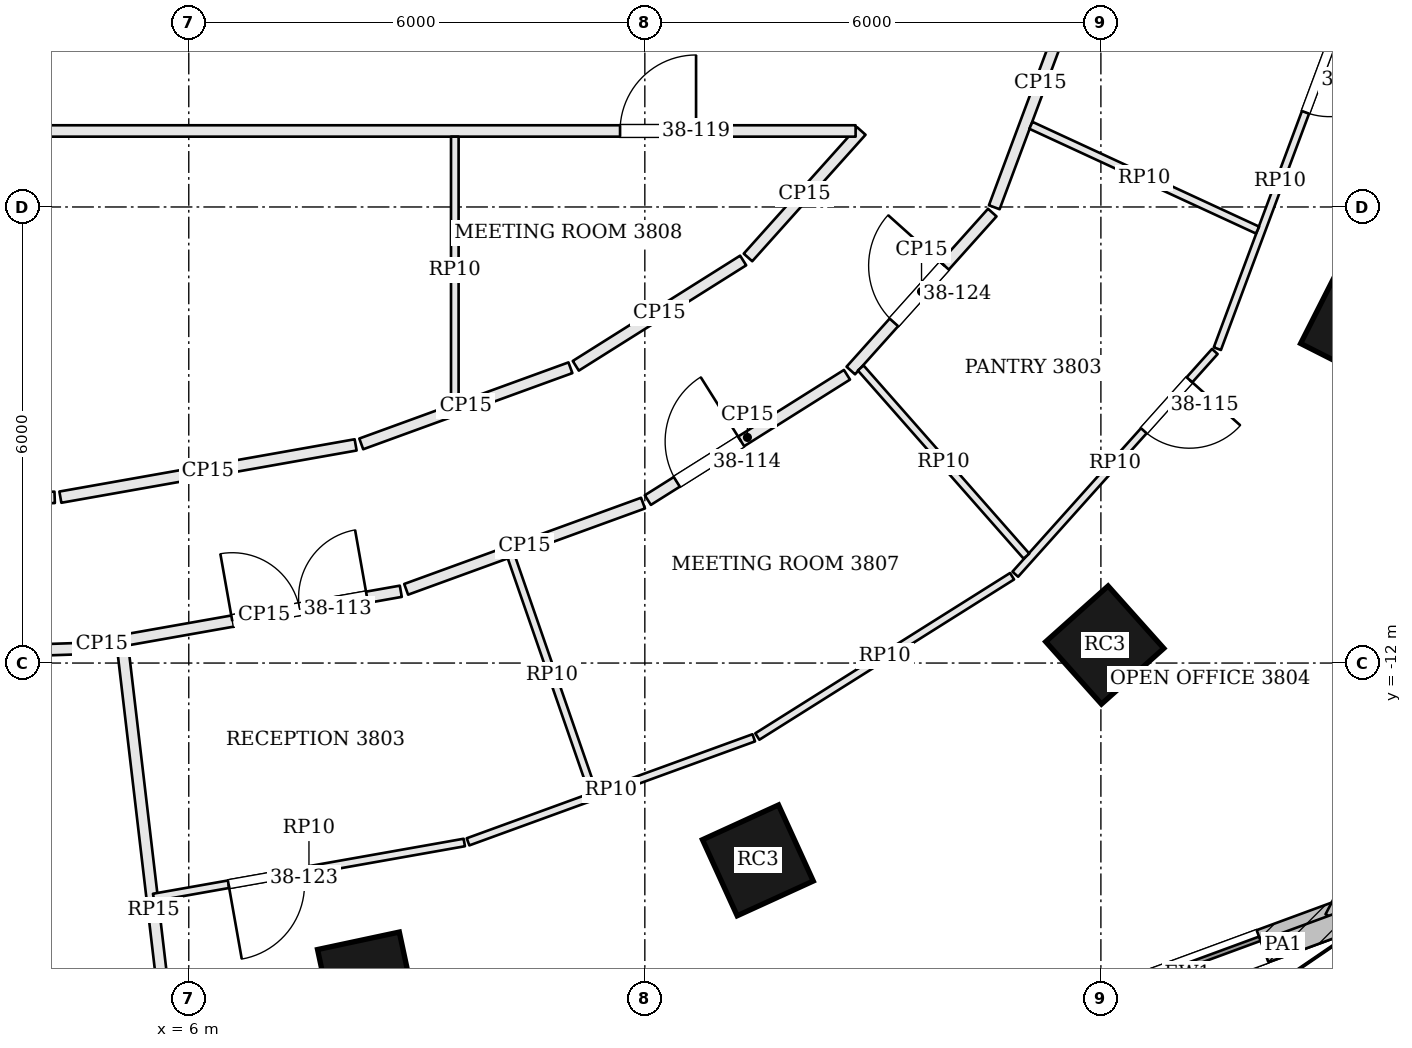
"""IFC4 building model, lengths in metres.
Left out: names, types, materials, properties, quantities, classifications, styles, units other than length and angle.
Written with IfcOpenShell. Run it as: python <this file> out.ifc"""

import sys

from ifc_helpers import new_model, si_unit, direction, frame, frame_2d, origin, origin_2d, place, context, subcontext, project, spatial, rectangle, extrude, element, fill, save


model = new_model("IFC4")
c1 = context("Model", 3, precision=1e-05, world=origin(), true_north=direction((0.0, 1.0)))
c2 = subcontext(c1, "Body", "Model", "MODEL_VIEW")
j1 = project(units=[si_unit("LENGTHUNIT", "METRE"), si_unit("PLANEANGLEUNIT", "RADIAN")], contexts=[c1])
p1 = place(None, origin())
s1 = spatial("IfcSite", under=j1, at=p1, CompositionType="ELEMENT")
p2 = place(p1, origin())
s2 = spatial("IfcBuilding", under=s1, at=p2, CompositionType="ELEMENT")
p3 = place(p2, frame((0.0, 0.0, 157.8)))
s3 = spatial("IfcBuildingStorey", under=s2, at=p3, CompositionType="ELEMENT", Elevation=157.8)
for number, where, z_axis, x_axis in (
    (1, (8.347, -16.192, 0.0), (0.0, 0.0, 1.0), (0.978, 0.209, 0.0)),
    (2, (13.487, -14.596, 0.0), (0.0, 0.0, 1.0), (0.91, 0.415, 0.0)),
    (3, (18.051, -11.763, 0.0), (0.0, 0.0, 1.0), (0.746, 0.666, 0.0)),
    (4, (21.367, -7.554, 0.0), (0.0, 0.0, 1.0), (0.452, 0.892, 0.0)),
):
    element("IfcColumn", number, at=place(p3, frame(where, z_axis=z_axis, x_axis=x_axis)), inside=s3, PredefinedType="COLUMN", context=c2, shape_type="SweptSolid", body=[
        extrude(rectangle(XDim=1.1, YDim=1.1, at=origin_2d()), origin(), (0.0, 0.0, 1.0), 3.9),
    ])
p4 = place(p3, frame((17.006, -16.873, 0.0), z_axis=(0.0, 0.0, 1.0), x_axis=(0.938563728531, 0.345105965591, 0.0)))
e5 = element("IfcWall", 5, at=p4, inside=s3, PredefinedType="SOLIDWALL", context=c2, shape_type="SweptSolid", body=[
    extrude(rectangle(XDim=4.55, YDim=0.45, at=frame_2d((2.275, 0.0))), origin(), (0.0, 0.0, 1.0), 3.7),
])
p5 = place(p4, frame((1.225, 0.0, 0.9)))
e6 = element("IfcOpeningElement", 6, at=p5, cuts=e5, PredefinedType="OPENING", context=c2, shape_type="SweptSolid", body=[
    extrude(rectangle(XDim=2.1, YDim=2.3, at=frame_2d((1.05, 1.15))), frame((0.0, 0.235, 0.0), z_axis=(0.0, -1.0, 0.0), x_axis=(1.0, 0.0, 0.0)), (0.0, 0.0, 1.0), 0.47),
])
p6 = place(p3, frame((21.155, -15.41, 0.0), z_axis=(0.0, 0.0, 1.0), x_axis=(0.46287314096, 0.886424534508, 0.0)))
e7 = element("IfcWall", 7, at=p6, inside=s3, PredefinedType="SOLIDWALL", context=c2, shape_type="SweptSolid", body=[
    extrude(rectangle(XDim=4.129, YDim=0.45, at=frame_2d((2.064, 0.0))), origin(), (0.0, 0.0, 1.0), 3.7),
])
p7 = place(p6, frame((1.014, 0.0, 0.9)))
e8 = element("IfcOpeningElement", 8, at=p7, cuts=e7, PredefinedType="OPENING", context=c2, shape_type="SweptSolid", body=[
    extrude(rectangle(XDim=2.1, YDim=2.3, at=frame_2d((1.05, 1.15))), frame((0.0, 0.235, 0.0), z_axis=(0.0, -1.0, 0.0), x_axis=(1.0, 0.0, 0.0)), (0.0, 0.0, 1.0), 0.47),
])
p8 = place(p3, frame((19.63, -15.988, 3.9), z_axis=(0.0, 0.0, 1.0), x_axis=(0.938567178283, 0.345096583364, 0.0)))
e9 = element("IfcWall", 9, at=p8, inside=s3, PredefinedType="PARAPET", context=c2, shape_type="SweptSolid", body=[
    extrude(rectangle(XDim=1.636, YDim=0.3, at=frame_2d((0.818, 0.0))), origin(), (0.0, 0.0, 1.0), 1.1),
])
p9 = place(p3, frame((-0.875, -11.993, 0.0), z_axis=(0.0, 0.0, 1.0), x_axis=(0.999436745295, 0.033558786542, 0.0)))
e10 = element("IfcWall", 10, at=p9, inside=s3, PredefinedType="PARTITIONING", context=c2, shape_type="SweptSolid", body=[
    extrude(rectangle(XDim=5.398, YDim=0.15, at=frame_2d((2.699, 0.0))), origin(), (0.0, 0.0, 1.0), 3.198),
])
p10 = place(p3, frame((4.594, -11.799, 0.0), z_axis=(0.0, 0.0, 1.0), x_axis=(0.984663784655, 0.174462692828, 0.0)))
e11 = element("IfcWall", 11, at=p10, inside=s3, PredefinedType="PARTITIONING", context=c2, shape_type="SweptSolid", body=[
    extrude(rectangle(XDim=0.535, YDim=0.15, at=frame_2d((0.267, 0.0))), origin(), (0.0, 0.0, 1.0), 3.198),
])
p11 = place(p3, frame((5.945, -18.719, 0.0), z_axis=(0.0, 0.0, 1.0), x_axis=(-0.116887879272, 0.99314511713, 0.0)))
e12 = element("IfcWall", 12, at=p11, inside=s3, PredefinedType="PARTITIONING", context=c2, shape_type="SweptSolid", body=[
    extrude(rectangle(XDim=6.987, YDim=0.15, at=frame_2d((3.493, 0.0))), origin(), (0.0, 0.0, 1.0), 3.234),
])
p12 = place(p3, frame((5.194, -11.692, 0.0), z_axis=(0.0, 0.0, 1.0), x_axis=(0.984692559416, 0.174300210646, 0.0)))
e13 = element("IfcWall", 13, at=p12, inside=s3, PredefinedType="PARTITIONING", context=c2, shape_type="SweptSolid", body=[
    extrude(rectangle(XDim=3.652, YDim=0.15, at=frame_2d((1.826, 0.0))), origin(), (0.0, 0.0, 1.0), 3.198),
])
p13 = place(p12, frame((1.4, 0.0, 0.0)))
e14 = element("IfcOpeningElement", 14, at=p13, cuts=e13, PredefinedType="OPENING", context=c2, shape_type="SweptSolid", body=[
    extrude(rectangle(XDim=1.8, YDim=2.1, at=frame_2d((0.9, 1.05))), frame((0.0, 0.085, 0.0), z_axis=(0.0, -1.0, 0.0), x_axis=(1.0, 0.0, 0.0)), (0.0, 0.0, 1.0), 0.17),
])
p14 = place(p3, frame((8.86, -11.03, 0.0), z_axis=(0.0, 0.0, 1.0), x_axis=(0.939685902536, 0.342038601001, 0.0)))
e15 = element("IfcWall", 15, at=p14, inside=s3, PredefinedType="PARTITIONING", context=c2, shape_type="SweptSolid", body=[
    extrude(rectangle(XDim=3.316, YDim=0.15, at=frame_2d((1.658, 0.0))), origin(), (0.0, 0.0, 1.0), 3.198),
])
p15 = place(p3, frame((12.04, -9.856, 0.0), z_axis=(0.0, 0.0, 1.0), x_axis=(0.846394809937, 0.532555936697, 0.0)))
e16 = element("IfcWall", 16, at=p15, inside=s3, PredefinedType="PARTITIONING", context=c2, shape_type="SweptSolid", body=[
    extrude(rectangle(XDim=3.095, YDim=0.15, at=frame_2d((1.548, 0.0))), origin(), (0.0, 0.0, 1.0), 3.198),
])
p16 = place(p15, frame((0.45, 0.0, 0.0)))
e17 = element("IfcOpeningElement", 17, at=p16, cuts=e16, PredefinedType="OPENING", context=c2, shape_type="SweptSolid", body=[
    extrude(rectangle(XDim=1.0, YDim=2.4, at=frame_2d((0.5, 1.2))), frame((0.0, 0.085, 0.0), z_axis=(0.0, -1.0, 0.0), x_axis=(1.0, 0.0, 0.0)), (0.0, 0.0, 1.0), 0.17),
])
p17 = place(p3, frame((14.709, -8.152, 0.0), z_axis=(0.0, 0.0, 1.0), x_axis=(0.667275630306, 0.744810870758, 0.0)))
e18 = element("IfcWall", 18, at=p17, inside=s3, PredefinedType="PARTITIONING", context=c2, shape_type="SweptSolid", body=[
    extrude(rectangle(XDim=2.79, YDim=0.15, at=frame_2d((1.395, 0.0))), origin(), (0.0, 0.0, 1.0), 3.198),
])
p18 = place(p17, frame((0.85, 0.0, 0.0)))
e19 = element("IfcOpeningElement", 19, at=p18, cuts=e18, PredefinedType="OPENING", context=c2, shape_type="SweptSolid", body=[
    extrude(rectangle(XDim=1.0, YDim=2.1, at=frame_2d((0.5, 1.05))), frame((0.0, 0.085, 0.0), z_axis=(0.0, -1.0, 0.0), x_axis=(1.0, 0.0, 0.0)), (0.0, 0.0, 1.0), 0.17),
])
p19 = place(p3, frame((16.597, -6.003, 0.0), z_axis=(0.0, 0.0, 1.0), x_axis=(0.349499455299, 0.936936567088, 0.0)))
e20 = element("IfcWall", 20, at=p19, inside=s3, PredefinedType="PARTITIONING", context=c2, shape_type="SweptSolid", body=[
    extrude(rectangle(XDim=3.477, YDim=0.15, at=frame_2d((1.739, 0.0))), origin(), (0.0, 0.0, 1.0), 3.198),
])
p20 = place(p3, frame((14.848, -5.0, 0.0), z_axis=(0.0, 0.0, 1.0), x_axis=(-0.667363249373, -0.744732363595, 0.0)))
e21 = element("IfcWall", 21, at=p20, inside=s3, PredefinedType="PARTITIONING", context=c2, shape_type="SweptSolid", body=[
    extrude(rectangle(XDim=2.234, YDim=0.15, at=frame_2d((1.117, 0.0))), origin(), (0.0, 0.0, 1.0), 3.198),
])
p21 = place(p3, frame((13.293, -6.704, 0.0), z_axis=(0.0, 0.0, 1.0), x_axis=(-0.84641299998, -0.532527026041, 0.0)))
e22 = element("IfcWall", 22, at=p21, inside=s3, PredefinedType="PARTITIONING", context=c2, shape_type="SweptSolid", body=[
    extrude(rectangle(XDim=2.602, YDim=0.15, at=frame_2d((1.301, 0.0))), origin(), (0.0, 0.0, 1.0), 3.198),
])
p22 = place(p3, frame((11.021, -8.115, 0.0), z_axis=(0.0, 0.0, 1.0), x_axis=(-0.939683845313, -0.342044252778, 0.0)))
e23 = element("IfcWall", 23, at=p22, inside=s3, PredefinedType="PARTITIONING", context=c2, shape_type="SweptSolid", body=[
    extrude(rectangle(XDim=2.929, YDim=0.15, at=frame_2d((1.464, 0.0))), origin(), (0.0, 0.0, 1.0), 3.198),
])
p23 = place(p3, frame((8.195, -9.13, 0.0), z_axis=(0.0, 0.0, 1.0), x_axis=(-0.9846880937, -0.174325437403, 0.0)))
e24 = element("IfcWall", 24, at=p23, inside=s3, PredefinedType="PARTITIONING", context=c2, shape_type="SweptSolid", body=[
    extrude(rectangle(XDim=3.945, YDim=0.15, at=frame_2d((1.973, 0.0))), origin(), (0.0, 0.0, 1.0), 3.198),
])
p24 = place(p3, frame((4.236, -9.82, 0.0), z_axis=(0.0, 0.0, 1.0), x_axis=(-0.999435760561, -0.033588100749, 0.0)))
e25 = element("IfcWall", 25, at=p24, inside=s3, PredefinedType="PARTITIONING", context=c2, shape_type="SweptSolid", body=[
    extrude(rectangle(XDim=5.146, YDim=0.15, at=frame_2d((2.573, 0.0))), origin(), (0.0, 0.0, 1.0), 3.198),
])
p25 = place(p3, frame((-14.789, -5.0, 0.0), z_axis=(0.0, 0.0, 1.0), x_axis=(1.0, 0.0, 0.0)))
e26 = element("IfcWall", 26, at=p25, inside=s3, PredefinedType="PARTITIONING", context=c2, shape_type="SweptSolid", body=[
    extrude(rectangle(XDim=29.562, YDim=0.15, at=frame_2d((14.781, 0.0))), origin(), (0.0, 0.0, 1.0), 3.198),
])
p26 = place(p25, frame((2.107, 0.0, 0.0)))
e27 = element("IfcOpeningElement", 27, at=p26, cuts=e26, PredefinedType="OPENING", context=c2, shape_type="SweptSolid", body=[
    extrude(rectangle(XDim=1.0, YDim=2.1, at=frame_2d((0.5, 1.05))), frame((0.0, 0.085, 0.0), z_axis=(0.0, -1.0, 0.0), x_axis=(1.0, 0.0, 0.0)), (0.0, 0.0, 1.0), 0.17),
])
p27 = place(p25, frame((13.889, 0.0, 0.0)))
e28 = element("IfcOpeningElement", 28, at=p27, cuts=e26, PredefinedType="OPENING", context=c2, shape_type="SweptSolid", body=[
    extrude(rectangle(XDim=1.8, YDim=2.1, at=frame_2d((0.9, 1.05))), frame((0.0, 0.085, 0.0), z_axis=(0.0, -1.0, 0.0), x_axis=(1.0, 0.0, 0.0)), (0.0, 0.0, 1.0), 0.17),
])
p28 = place(p25, frame((26.463, 0.0, 0.0)))
e29 = element("IfcOpeningElement", 29, at=p28, cuts=e26, PredefinedType="OPENING", context=c2, shape_type="SweptSolid", body=[
    extrude(rectangle(XDim=1.0, YDim=2.4, at=frame_2d((0.5, 1.2))), frame((0.0, 0.085, 0.0), z_axis=(0.0, -1.0, 0.0), x_axis=(1.0, 0.0, 0.0)), (0.0, 0.0, 1.0), 0.17),
])
p29 = place(p3, frame((21.181, -3.443, 0.0), z_axis=(0.0, 0.0, 1.0), x_axis=(-0.349438657616, -0.936959243811, 0.0)))
e30 = element("IfcWall", 30, at=p29, inside=s3, PredefinedType="PARTITIONING", context=c2, shape_type="SweptSolid", body=[
    extrude(rectangle(XDim=4.718, YDim=0.1, at=frame_2d((2.359, 0.0))), origin(), (0.0, 0.0, 1.0), 3.184),
])
p30 = place(p29, frame((0.5, 0.0, 0.0)))
e31 = element("IfcOpeningElement", 31, at=p30, cuts=e30, PredefinedType="OPENING", context=c2, shape_type="SweptSolid", body=[
    extrude(rectangle(XDim=0.9, YDim=2.1, at=frame_2d((0.45, 1.05))), frame((0.0, 0.06, 0.0), z_axis=(0.0, -1.0, 0.0), x_axis=(1.0, 0.0, 0.0)), (0.0, 0.0, 1.0), 0.12),
])
p31 = place(p3, frame((19.499, -7.901, 0.0), z_axis=(0.0, 0.0, 1.0), x_axis=(-0.667320762971, -0.744770433964, 0.0)))
e32 = element("IfcWall", 32, at=p31, inside=s3, PredefinedType="PARTITIONING", context=c2, shape_type="SweptSolid", body=[
    extrude(rectangle(XDim=3.934, YDim=0.1, at=frame_2d((1.967, 0.0))), origin(), (0.0, 0.0, 1.0), 3.184),
])
p32 = place(p31, frame((0.5, 0.0, 0.0)))
e33 = element("IfcOpeningElement", 33, at=p32, cuts=e32, PredefinedType="OPENING", context=c2, shape_type="SweptSolid", body=[
    extrude(rectangle(XDim=0.9, YDim=2.1, at=frame_2d((0.45, 1.05))), frame((0.0, 0.06, 0.0), z_axis=(0.0, -1.0, 0.0), x_axis=(1.0, 0.0, 0.0)), (0.0, 0.0, 1.0), 0.12),
])
p33 = place(p3, frame((16.831, -10.858, 0.0), z_axis=(0.0, 0.0, 1.0), x_axis=(-0.846415033443, -0.532523793987, 0.0)))
e34 = element("IfcWall", 34, at=p33, inside=s3, PredefinedType="PARTITIONING", context=c2, shape_type="SweptSolid", body=[
    extrude(rectangle(XDim=3.96, YDim=0.1, at=frame_2d((1.98, 0.0))), origin(), (0.0, 0.0, 1.0), 3.184),
])
p34 = place(p3, frame((13.433, -12.984, 0.0), z_axis=(0.0, 0.0, 1.0), x_axis=(-0.939673979614, -0.342071355182, 0.0)))
e35 = element("IfcWall", 35, at=p34, inside=s3, PredefinedType="PARTITIONING", context=c2, shape_type="SweptSolid", body=[
    extrude(rectangle(XDim=4.0, YDim=0.1, at=frame_2d((2.0, 0.0))), origin(), (0.0, 0.0, 1.0), 3.184),
])
p35 = place(p3, frame((9.625, -14.361, 0.0), z_axis=(0.0, 0.0, 1.0), x_axis=(-0.984695796624, -0.174281921355, 0.0)))
e36 = element("IfcWall", 36, at=p35, inside=s3, PredefinedType="PARTITIONING", context=c2, shape_type="SweptSolid", body=[
    extrude(rectangle(XDim=4.151, YDim=0.1, at=frame_2d((2.075, 0.0))), origin(), (0.0, 0.0, 1.0), 3.184),
])
p36 = place(p35, frame((2.15, 0.0, 0.0)))
e37 = element("IfcOpeningElement", 37, at=p36, cuts=e36, PredefinedType="OPENING", context=c2, shape_type="SweptSolid", body=[
    extrude(rectangle(XDim=1.0, YDim=2.1, at=frame_2d((0.5, 1.05))), frame((0.0, 0.06, 0.0), z_axis=(0.0, -1.0, 0.0), x_axis=(1.0, 0.0, 0.0)), (0.0, 0.0, 1.0), 0.12),
])
p37 = place(p3, frame((10.244, -10.606, 0.0), z_axis=(0.0, 0.0, 1.0), x_axis=(0.327520147745, -0.944844194998, 0.0)))
e38 = element("IfcWall", 38, at=p37, inside=s3, PredefinedType="PARTITIONING", context=c2, shape_type="SweptSolid", body=[
    extrude(rectangle(XDim=3.275, YDim=0.1, at=frame_2d((1.638, 0.0))), origin(), (0.0, 0.0, 1.0), 3.184),
])
p38 = place(p3, frame((14.84, -8.118, 0.0), z_axis=(0.0, 0.0, 1.0), x_axis=(0.661031535184, -0.750358120828, 0.0)))
e39 = element("IfcWall", 39, at=p38, inside=s3, PredefinedType="PARTITIONING", context=c2, shape_type="SweptSolid", body=[
    extrude(rectangle(XDim=3.299, YDim=0.1, at=frame_2d((1.649, 0.0))), origin(), (0.0, 0.0, 1.0), 3.184),
])
p39 = place(p3, frame((17.079, -4.926, 0.0), z_axis=(0.0, 0.0, 1.0), x_axis=(0.90772648151, -0.4195624325, 0.0)))
e40 = element("IfcWall", 40, at=p39, inside=s3, PredefinedType="PARTITIONING", context=c2, shape_type="SweptSolid", body=[
    extrude(rectangle(XDim=3.285, YDim=0.1, at=frame_2d((1.642, 0.0))), origin(), (0.0, 0.0, 1.0), 3.184),
])
p40 = place(p3, frame((9.5, -8.594, 0.0), z_axis=(0.0, 0.0, 1.0), x_axis=(0.0, 1.0, 0.0)))
e41 = element("IfcWall", 41, at=p40, inside=s3, PredefinedType="PARTITIONING", context=c2, shape_type="SweptSolid", body=[
    extrude(rectangle(XDim=3.519, YDim=0.1, at=frame_2d((1.759, 0.0))), origin(), (0.0, 0.0, 1.0), 3.184),
])
p41 = place(p5, origin())
e42 = element("IfcWindow", 42, at=p41, inside=s3, PartitioningType="SINGLE_PANEL", PredefinedType="WINDOW", context=c2, shape_type="SweptSolid", body=[
    extrude(rectangle(XDim=2.1, YDim=2.3, at=frame_2d((1.05, 1.15))), frame((0.0, 0.135, 0.0), z_axis=(0.0, -1.0, 0.0), x_axis=(1.0, 0.0, 0.0)), (0.0, 0.0, 1.0), 0.06),
])
fill(e6, e42)
p42 = place(p13, origin())
e43 = element("IfcDoor", 43, at=p42, inside=s3, OperationType="DOUBLE_DOOR_SINGLE_SWING", PredefinedType="DOOR", context=c2, shape_type="SweptSolid", body=[
    extrude(rectangle(XDim=1.8, YDim=2.1, at=frame_2d((0.9, 1.05))), frame((0.0, 0.025, 0.0), z_axis=(0.0, -1.0, 0.0), x_axis=(1.0, 0.0, 0.0)), (0.0, 0.0, 1.0), 0.05),
])
fill(e14, e43)
p43 = place(p16, origin())
e44 = element("IfcDoor", 44, at=p43, inside=s3, OperationType="SINGLE_SWING_RIGHT", PredefinedType="DOOR", context=c2, shape_type="SweptSolid", body=[
    extrude(rectangle(XDim=1.0, YDim=2.4, at=frame_2d((0.5, 1.2))), frame((0.0, 0.025, 0.0), z_axis=(0.0, -1.0, 0.0), x_axis=(1.0, 0.0, 0.0)), (0.0, 0.0, 1.0), 0.05),
])
fill(e17, e44)
p44 = place(p32, origin())
e45 = element("IfcDoor", 45, at=p44, inside=s3, OperationType="SINGLE_SWING_LEFT", PredefinedType="DOOR", context=c2, shape_type="SweptSolid", body=[
    extrude(rectangle(XDim=0.9, YDim=2.1, at=frame_2d((0.45, 1.05))), frame((0.0, 0.025, 0.0), z_axis=(0.0, -1.0, 0.0), x_axis=(1.0, 0.0, 0.0)), (0.0, 0.0, 1.0), 0.05),
])
fill(e33, e45)
p45 = place(p30, origin())
e46 = element("IfcDoor", 46, at=p45, inside=s3, OperationType="SINGLE_SWING_LEFT", PredefinedType="DOOR", context=c2, shape_type="SweptSolid", body=[
    extrude(rectangle(XDim=0.9, YDim=2.1, at=frame_2d((0.45, 1.05))), frame((0.0, 0.025, 0.0), z_axis=(0.0, -1.0, 0.0), x_axis=(1.0, 0.0, 0.0)), (0.0, 0.0, 1.0), 0.05),
])
fill(e31, e46)
p46 = place(p28, origin())
e47 = element("IfcDoor", 47, at=p46, inside=s3, OperationType="SINGLE_SWING_RIGHT", PredefinedType="DOOR", context=c2, shape_type="SweptSolid", body=[
    extrude(rectangle(XDim=1.0, YDim=2.4, at=frame_2d((0.5, 1.2))), frame((0.0, 0.025, 0.0), z_axis=(0.0, -1.0, 0.0), x_axis=(1.0, 0.0, 0.0)), (0.0, 0.0, 1.0), 0.05),
])
fill(e29, e47)
p47 = place(p36, origin())
e48 = element("IfcDoor", 48, at=p47, inside=s3, OperationType="SINGLE_SWING_RIGHT", PredefinedType="DOOR", context=c2, shape_type="SweptSolid", body=[
    extrude(rectangle(XDim=1.0, YDim=2.1, at=frame_2d((0.5, 1.05))), frame((0.0, 0.025, 0.0), z_axis=(0.0, -1.0, 0.0), x_axis=(1.0, 0.0, 0.0)), (0.0, 0.0, 1.0), 0.05),
])
fill(e37, e48)
p48 = place(p18, origin())
e49 = element("IfcDoor", 49, at=p48, inside=s3, OperationType="SINGLE_SWING_RIGHT", PredefinedType="DOOR", context=c2, shape_type="SweptSolid", body=[
    extrude(rectangle(XDim=1.0, YDim=2.1, at=frame_2d((0.5, 1.05))), frame((0.0, 0.025, 0.0), z_axis=(0.0, -1.0, 0.0), x_axis=(1.0, 0.0, 0.0)), (0.0, 0.0, 1.0), 0.05),
])
fill(e19, e49)
save(model, sys.argv[1])
